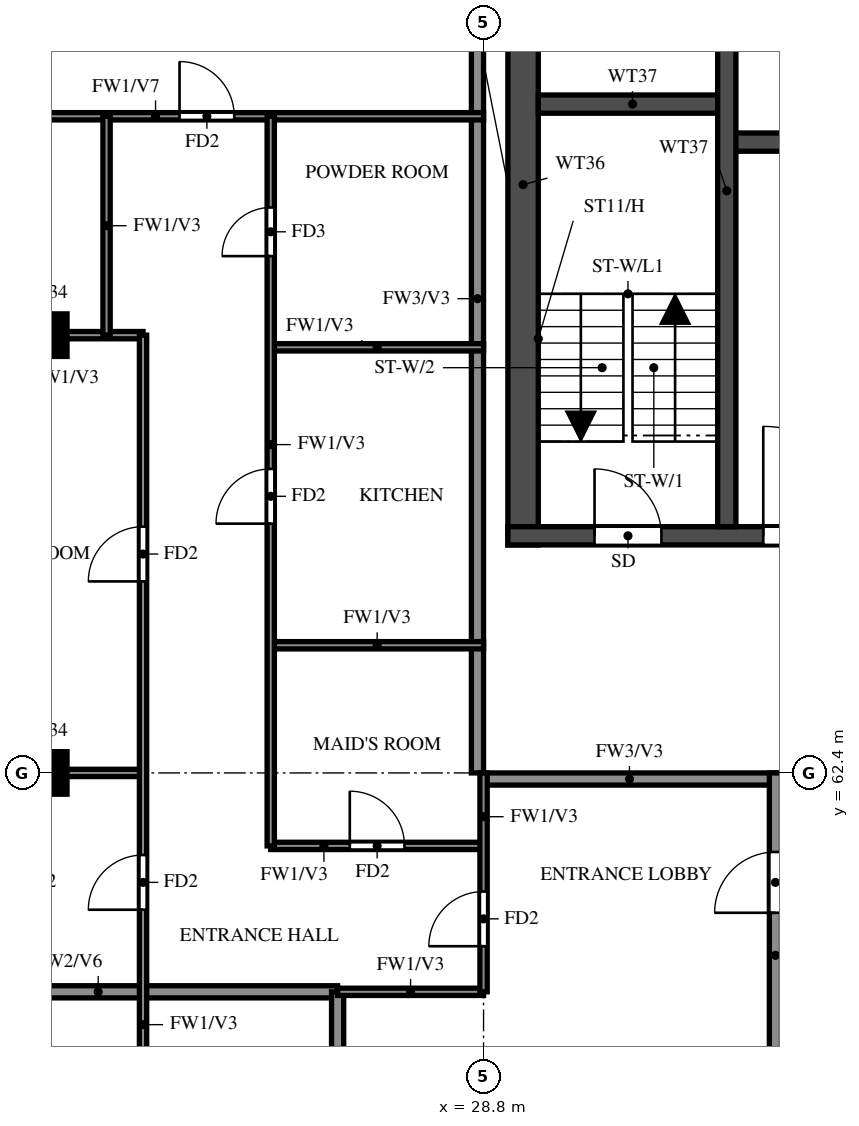
"""IFC4 building model, lengths in metres.
Left out: names, types, materials, properties, quantities, classifications, styles, units other than length and angle.
Written with IfcOpenShell. Run it as: python <this file> out.ifc"""

import sys

from ifc_helpers import new_model, si_unit, direction, frame, frame_2d, origin, origin_2d, place, context, subcontext, project, spatial, rectangle, extrude, source, transform, mapped, element, fill, save


model = new_model("IFC4")
c1 = context("Model", 3, precision=1e-05, world=origin(), true_north=direction((0.0, 1.0)))
c2 = subcontext(c1, "Body", "Model", "MODEL_VIEW")
j1 = project(units=[si_unit("LENGTHUNIT", "METRE"), si_unit("PLANEANGLEUNIT", "RADIAN")], contexts=[c1])
p1 = place(None, origin())
s1 = spatial("IfcSite", under=j1, at=p1, CompositionType="ELEMENT")
p2 = place(p1, origin())
s2 = spatial("IfcBuilding", under=s1, at=p2, CompositionType="ELEMENT")
p3 = place(p2, frame((0.0, 0.0, 253.5)))
s3 = spatial("IfcBuildingStorey", under=s2, at=p3, CompositionType="ELEMENT", Elevation=253.5)
m1 = source(origin(), c2, "Body", "SweptSolid", [
    extrude(rectangle(XDim=0.7, YDim=0.7, at=origin_2d()), origin(), (0.0, 0.0, 1.0), 3.22),
])
for number, where, z_axis, x_axis in (
    (1, (21.6, 62.4, 0.0), (0.0, 0.0, 1.0), (1.0, 0.0, 0.0)),
    (2, (21.6, 69.6, 0.0), (0.0, 0.0, 1.0), (1.0, 0.0, 0.0)),
):
    element("IfcColumn", number, at=place(p3, frame(where, z_axis=z_axis, x_axis=x_axis)), inside=s3, PredefinedType="COLUMN", context=c2, shape_type="MappedRepresentation", body=[
        mapped(m1, transform((0.0, 0.0, 0.0))),
    ])
p4 = place(p3, frame((29.45, 66.15, 0.0), z_axis=(0.0, 0.0, 1.0), x_axis=(0.0, 1.0, 0.0)))
e3 = element("IfcWall", 3, at=p4, inside=s3, PredefinedType="SHEAR", context=c2, shape_type="SweptSolid", body=[
    extrude(rectangle(XDim=11.85, YDim=0.5, at=frame_2d((5.925, 0.0))), origin(), (0.0, 0.0, 1.0), 3.22),
])
p5 = place(p3, frame((29.2, 66.3, 0.0), z_axis=(0.0, 0.0, 1.0), x_axis=(1.0, 0.0, 0.0)))
e4 = element("IfcWall", 4, at=p5, inside=s3, PredefinedType="SHEAR", context=c2, shape_type="SweptSolid", body=[
    extrude(rectangle(XDim=42.4, YDim=0.3, at=frame_2d((21.2, 0.0))), origin(), (0.0, 0.0, 1.0), 3.22),
])
p6 = place(p5, frame((1.425, 0.0, 0.0)))
e5 = element("IfcOpeningElement", 5, at=p6, cuts=e4, PredefinedType="OPENING", context=c2, shape_type="SweptSolid", body=[
    extrude(rectangle(XDim=1.1, YDim=2.1, at=frame_2d((0.55, 1.05))), frame((0.0, 0.16, 0.0), z_axis=(0.0, -1.0, 0.0), x_axis=(1.0, 0.0, 0.0)), (0.0, 0.0, 1.0), 0.32),
])
p7 = place(p5, frame((4.2, 0.0, 0.0)))
e6 = element("IfcOpeningElement", 6, at=p7, cuts=e4, PredefinedType="OPENING", context=c2, shape_type="SweptSolid", body=[
    extrude(rectangle(XDim=1.8, YDim=2.1, at=frame_2d((0.9, 1.05))), frame((0.0, 0.16, 0.0), z_axis=(0.0, -1.0, 0.0), x_axis=(1.0, 0.0, 0.0)), (0.0, 0.0, 1.0), 0.32),
])
p8 = place(p3, frame((32.8, 72.775, 0.0), z_axis=(0.0, 0.0, 1.0), x_axis=(1.0, 0.0, 0.0)))
e7 = element("IfcWall", 7, at=p8, inside=s3, PredefinedType="SHEAR", context=c2, shape_type="SweptSolid", body=[
    extrude(rectangle(XDim=35.2, YDim=0.3, at=frame_2d((17.6, 0.0))), origin(), (0.0, 0.0, 1.0), 3.22),
])
p9 = place(p8, frame((19.8, 0.0, 0.0)))
e8 = element("IfcOpeningElement", 8, at=p9, cuts=e7, PredefinedType="OPENING", context=c2, shape_type="SweptSolid", body=[
    extrude(rectangle(XDim=1.1, YDim=2.1, at=frame_2d((0.55, 1.05))), frame((0.0, 0.16, 0.0), z_axis=(0.0, -1.0, 0.0), x_axis=(1.0, 0.0, 0.0)), (0.0, 0.0, 1.0), 0.32),
])
p10 = place(p8, frame((27.725, 0.0, 0.0)))
e9 = element("IfcOpeningElement", 9, at=p10, cuts=e7, PredefinedType="OPENING", context=c2, shape_type="SweptSolid", body=[
    extrude(rectangle(XDim=1.1, YDim=2.1, at=frame_2d((0.55, 1.05))), frame((0.0, 0.16, 0.0), z_axis=(0.0, -1.0, 0.0), x_axis=(1.0, 0.0, 0.0)), (0.0, 0.0, 1.0), 0.32),
])
p11 = place(p8, frame((30.325, 0.0, 0.0)))
e10 = element("IfcOpeningElement", 10, at=p11, cuts=e7, PredefinedType="OPENING", context=c2, shape_type="SweptSolid", body=[
    extrude(rectangle(XDim=1.1, YDim=2.1, at=frame_2d((0.55, 1.05))), frame((0.0, 0.16, 0.0), z_axis=(0.0, -1.0, 0.0), x_axis=(1.0, 0.0, 0.0)), (0.0, 0.0, 1.0), 0.32),
])
p12 = place(p8, frame((3.825, 0.0, 0.0)))
e11 = element("IfcOpeningElement", 11, at=p12, cuts=e7, PredefinedType="OPENING", context=c2, shape_type="SweptSolid", body=[
    extrude(rectangle(XDim=1.1, YDim=2.1, at=frame_2d((0.55, 1.05))), frame((0.0, 0.16, 0.0), z_axis=(0.0, -1.0, 0.0), x_axis=(1.0, 0.0, 0.0)), (0.0, 0.0, 1.0), 0.32),
])
p13 = place(p8, frame((6.575, 0.0, 0.0)))
e12 = element("IfcOpeningElement", 12, at=p13, cuts=e7, PredefinedType="OPENING", context=c2, shape_type="SweptSolid", body=[
    extrude(rectangle(XDim=1.1, YDim=2.1, at=frame_2d((0.55, 1.05))), frame((0.0, 0.16, 0.0), z_axis=(0.0, -1.0, 0.0), x_axis=(1.0, 0.0, 0.0)), (0.0, 0.0, 1.0), 0.32),
])
p14 = place(p8, frame((9.325, 0.0, 0.0)))
e13 = element("IfcOpeningElement", 13, at=p14, cuts=e7, PredefinedType="OPENING", context=c2, shape_type="SweptSolid", body=[
    extrude(rectangle(XDim=1.1, YDim=2.1, at=frame_2d((0.55, 1.05))), frame((0.0, 0.16, 0.0), z_axis=(0.0, -1.0, 0.0), x_axis=(1.0, 0.0, 0.0)), (0.0, 0.0, 1.0), 0.32),
])
p15 = place(p8, frame((12.075, 0.0, 0.0)))
e14 = element("IfcOpeningElement", 14, at=p15, cuts=e7, PredefinedType="OPENING", context=c2, shape_type="SweptSolid", body=[
    extrude(rectangle(XDim=1.1, YDim=2.1, at=frame_2d((0.55, 1.05))), frame((0.0, 0.16, 0.0), z_axis=(0.0, -1.0, 0.0), x_axis=(1.0, 0.0, 0.0)), (0.0, 0.0, 1.0), 0.32),
])
p16 = place(p8, frame((14.825, 0.0, 0.0)))
e15 = element("IfcOpeningElement", 15, at=p16, cuts=e7, PredefinedType="OPENING", context=c2, shape_type="SweptSolid", body=[
    extrude(rectangle(XDim=1.1, YDim=2.1, at=frame_2d((0.55, 1.05))), frame((0.0, 0.16, 0.0), z_axis=(0.0, -1.0, 0.0), x_axis=(1.0, 0.0, 0.0)), (0.0, 0.0, 1.0), 0.32),
])
p17 = place(p8, frame((17.575, 0.0, 0.0)))
e16 = element("IfcOpeningElement", 16, at=p17, cuts=e7, PredefinedType="OPENING", context=c2, shape_type="SweptSolid", body=[
    extrude(rectangle(XDim=1.1, YDim=2.1, at=frame_2d((0.55, 1.05))), frame((0.0, 0.16, 0.0), z_axis=(0.0, -1.0, 0.0), x_axis=(1.0, 0.0, 0.0)), (0.0, 0.0, 1.0), 0.32),
])
p18 = place(p8, frame((0.95, 0.0, 0.0)))
e17 = element("IfcOpeningElement", 17, at=p18, cuts=e7, PredefinedType="OPENING", context=c2, shape_type="SweptSolid", body=[
    extrude(rectangle(XDim=1.1, YDim=2.1, at=frame_2d((0.55, 1.05))), frame((0.0, 0.16, 0.0), z_axis=(0.0, -1.0, 0.0), x_axis=(1.0, 0.0, 0.0)), (0.0, 0.0, 1.0), 0.32),
])
p19 = place(p3, frame((29.7, 73.4, 0.0), z_axis=(0.0, 0.0, 1.0), x_axis=(1.0, 0.0, 0.0)))
e18 = element("IfcWall", 18, at=p19, inside=s3, PredefinedType="SHEAR", context=c2, shape_type="SweptSolid", body=[
    extrude(rectangle(XDim=3.1, YDim=0.3, at=frame_2d((1.55, 0.0))), origin(), (0.0, 0.0, 1.0), 3.22),
])
p20 = place(p3, frame((32.8, 66.45, 0.0), z_axis=(0.0, 0.0, 1.0), x_axis=(0.0, 1.0, 0.0)))
e19 = element("IfcWall", 19, at=p20, inside=s3, PredefinedType="SHEAR", context=c2, shape_type="SweptSolid", body=[
    extrude(rectangle(XDim=11.05, YDim=0.3, at=frame_2d((5.525, 0.0))), origin(), (0.0, 0.0, 1.0), 3.22),
])
p21 = place(p3, frame((28.8, 62.3, 0.0), z_axis=(0.0, 0.0, 1.0), x_axis=(1.0, 0.0, 0.0)))
e20 = element("IfcWall", 20, at=p21, inside=s3, PredefinedType="SOLIDWALL", context=c2, shape_type="SweptSolid", body=[
    extrude(rectangle(XDim=4.8, YDim=0.2, at=frame_2d((2.4, 0.0))), origin(), (0.0, 0.0, 1.0), 3.22),
])
p22 = place(p3, frame((28.7, 62.4, 0.0), z_axis=(0.0, 0.0, 1.0), x_axis=(0.0, 1.0, 0.0)))
e21 = element("IfcWall", 21, at=p22, inside=s3, PredefinedType="SOLIDWALL", context=c2, shape_type="SweptSolid", body=[
    extrude(rectangle(XDim=15.6, YDim=0.2, at=frame_2d((7.8, 0.0))), origin(), (0.0, 0.0, 1.0), 3.22),
])
p23 = place(p3, frame((33.6, 56.4, 0.0), z_axis=(0.0, 0.0, 1.0), x_axis=(0.0, 1.0, 0.0)))
e22 = element("IfcWall", 22, at=p23, inside=s3, PredefinedType="SOLIDWALL", context=c2, shape_type="SweptSolid", body=[
    extrude(rectangle(XDim=6.0, YDim=0.2, at=frame_2d((3.0, 0.0))), origin(), (0.0, 0.0, 1.0), 3.22),
])
p24 = place(p23, frame((3.7, 0.0, 0.0)))
e23 = element("IfcOpeningElement", 23, at=p24, cuts=e22, PredefinedType="OPENING", context=c2, shape_type="SweptSolid", body=[
    extrude(rectangle(XDim=1.0, YDim=2.1, at=frame_2d((0.5, 1.05))), frame((0.0, 0.11, 0.0), z_axis=(0.0, -1.0, 0.0), x_axis=(1.0, 0.0, 0.0)), (0.0, 0.0, 1.0), 0.22),
])
p25 = place(p3, frame((18.525, 58.8, 0.0), z_axis=(0.0, 0.0, 1.0), x_axis=(1.0, 0.0, 0.0)))
e24 = element("IfcWall", 24, at=p25, inside=s3, PredefinedType="SOLIDWALL", context=c2, shape_type="SweptSolid", body=[
    extrude(rectangle(XDim=7.875, YDim=0.2, at=frame_2d((3.938, 0.0))), origin(), (0.0, 0.0, 1.0), 2.32),
])
p26 = place(p3, frame((26.4, 56.4, 0.0), z_axis=(0.0, 0.0, 1.0), x_axis=(0.0, 1.0, 0.0)))
e25 = element("IfcWall", 25, at=p26, inside=s3, PredefinedType="SOLIDWALL", context=c2, shape_type="SweptSolid", body=[
    extrude(rectangle(XDim=2.4, YDim=0.2, at=frame_2d((1.2, 0.0))), origin(), (0.0, 0.0, 1.0), 3.22),
])
p27 = place(p3, frame((26.4, 58.8, 0.0), z_axis=(0.0, 0.0, 1.0), x_axis=(1.0, 0.0, 0.0)))
e26 = element("IfcWall", 26, at=p27, inside=s3, PredefinedType="PARTITIONING", context=c2, shape_type="SweptSolid", body=[
    extrude(rectangle(XDim=2.4, YDim=0.12, at=frame_2d((1.2, 0.0))), origin(), (0.0, 0.0, 1.0), 3.22),
])
p28 = place(p3, frame((25.3, 61.2, 0.0), z_axis=(0.0, 0.0, 1.0), x_axis=(1.0, 0.0, 0.0)))
e27 = element("IfcWall", 27, at=p28, inside=s3, PredefinedType="PARTITIONING", context=c2, shape_type="SweptSolid", body=[
    extrude(rectangle(XDim=3.5, YDim=0.12, at=frame_2d((1.75, 0.0))), origin(), (0.0, 0.0, 1.0), 3.22),
])
p29 = place(p28, frame((1.3, 0.0, 0.0)))
e28 = element("IfcOpeningElement", 28, at=p29, cuts=e27, PredefinedType="OPENING", context=c2, shape_type="SweptSolid", body=[
    extrude(rectangle(XDim=0.9, YDim=2.1, at=frame_2d((0.45, 1.05))), frame((0.0, 0.07, 0.0), z_axis=(0.0, -1.0, 0.0), x_axis=(1.0, 0.0, 0.0)), (0.0, 0.0, 1.0), 0.14),
])
p30 = place(p3, frame((18.525, 62.4, 0.0), z_axis=(0.0, 0.0, 1.0), x_axis=(1.0, 0.0, 0.0)))
e29 = element("IfcWall", 29, at=p30, inside=s3, PredefinedType="PARTITIONING", context=c2, shape_type="SweptSolid", body=[
    extrude(rectangle(XDim=4.675, YDim=0.12, at=frame_2d((2.337, 0.0))), origin(), (0.0, 0.0, 1.0), 3.22),
])
for number, where, z_axis, x_axis in (
    (30, (25.3, 64.5, 0.0), (0.0, 0.0, 1.0), (1.0, 0.0, 0.0)),
    (31, (25.3, 69.4, 0.0), (0.0, 0.0, 1.0), (1.0, 0.0, 0.0)),
):
    element("IfcWall", number, at=place(p3, frame(where, z_axis=z_axis, x_axis=x_axis)), inside=s3, PredefinedType="PARTITIONING", context=c2, shape_type="SweptSolid", body=[
        extrude(rectangle(XDim=3.5, YDim=0.12, at=frame_2d((1.75, 0.0))), origin(), (0.0, 0.0, 1.0), 3.22),
    ])
p31 = place(p3, frame((18.525, 69.6, 0.0), z_axis=(0.0, 0.0, 1.0), x_axis=(1.0, 0.0, 0.0)))
e32 = element("IfcWall", 32, at=p31, inside=s3, PredefinedType="PARTITIONING", context=c2, shape_type="SweptSolid", body=[
    extrude(rectangle(XDim=4.675, YDim=0.12, at=frame_2d((2.337, 0.0))), origin(), (0.0, 0.0, 1.0), 3.22),
])
p32 = place(p31, frame((1.538, 0.0, 0.0)))
e33 = element("IfcOpeningElement", 33, at=p32, cuts=e32, PredefinedType="OPENING", context=c2, shape_type="SweptSolid", body=[
    extrude(rectangle(XDim=0.8, YDim=2.1, at=frame_2d((0.4, 1.05))), frame((0.0, 0.07, 0.0), z_axis=(0.0, -1.0, 0.0), x_axis=(1.0, 0.0, 0.0)), (0.0, 0.0, 1.0), 0.14),
])
p33 = place(p3, frame((18.525, 73.2, 0.0), z_axis=(0.0, 0.0, 1.0), x_axis=(1.0, 0.0, 0.0)))
e34 = element("IfcWall", 34, at=p33, inside=s3, PredefinedType="PARTITIONING", context=c2, shape_type="SweptSolid", body=[
    extrude(rectangle(XDim=10.275, YDim=0.12, at=frame_2d((5.138, 0.0))), origin(), (0.0, 0.0, 1.0), 2.32),
])
p34 = place(p33, frame((5.275, 0.0, 0.0)))
e35 = element("IfcOpeningElement", 35, at=p34, cuts=e34, PredefinedType="OPENING", context=c2, shape_type="SweptSolid", body=[
    extrude(rectangle(XDim=0.9, YDim=2.1, at=frame_2d((0.45, 1.05))), frame((0.0, 0.07, 0.0), z_axis=(0.0, -1.0, 0.0), x_axis=(1.0, 0.0, 0.0)), (0.0, 0.0, 1.0), 0.14),
])
p35 = place(p3, frame((22.6, 69.6, 0.0), z_axis=(0.0, 0.0, 1.0), x_axis=(0.0, 1.0, 0.0)))
e36 = element("IfcWall", 36, at=p35, inside=s3, PredefinedType="PARTITIONING", context=c2, shape_type="SweptSolid", body=[
    extrude(rectangle(XDim=3.6, YDim=0.12, at=frame_2d((1.8, 0.0))), origin(), (0.0, 0.0, 1.0), 3.22),
])
p36 = place(p3, frame((23.2, 48.0, 0.0), z_axis=(0.0, 0.0, 1.0), x_axis=(0.0, 1.0, 0.0)))
e37 = element("IfcWall", 37, at=p36, inside=s3, PredefinedType="PARTITIONING", context=c2, shape_type="SweptSolid", body=[
    extrude(rectangle(XDim=21.6, YDim=0.12, at=frame_2d((10.8, 0.0))), origin(), (0.0, 0.0, 1.0), 3.22),
])
p37 = place(p36, frame((1.35, 0.0, 0.0)))
e38 = element("IfcOpeningElement", 38, at=p37, cuts=e37, PredefinedType="OPENING", context=c2, shape_type="SweptSolid", body=[
    extrude(rectangle(XDim=0.9, YDim=2.1, at=frame_2d((0.45, 1.05))), frame((0.0, 0.07, 0.0), z_axis=(0.0, -1.0, 0.0), x_axis=(1.0, 0.0, 0.0)), (0.0, 0.0, 1.0), 0.14),
])
p38 = place(p36, frame((7.95, 0.0, 0.0)))
e39 = element("IfcOpeningElement", 39, at=p38, cuts=e37, PredefinedType="OPENING", context=c2, shape_type="SweptSolid", body=[
    extrude(rectangle(XDim=1.5, YDim=2.1, at=frame_2d((0.75, 1.05))), frame((0.0, 0.07, 0.0), z_axis=(0.0, -1.0, 0.0), x_axis=(1.0, 0.0, 0.0)), (0.0, 0.0, 1.0), 0.14),
])
p39 = place(p36, frame((12.15, 0.0, 0.0)))
e40 = element("IfcOpeningElement", 40, at=p39, cuts=e37, PredefinedType="OPENING", context=c2, shape_type="SweptSolid", body=[
    extrude(rectangle(XDim=0.9, YDim=2.1, at=frame_2d((0.45, 1.05))), frame((0.0, 0.07, 0.0), z_axis=(0.0, -1.0, 0.0), x_axis=(1.0, 0.0, 0.0)), (0.0, 0.0, 1.0), 0.14),
])
p40 = place(p36, frame((17.55, 0.0, 0.0)))
e41 = element("IfcOpeningElement", 41, at=p40, cuts=e37, PredefinedType="OPENING", context=c2, shape_type="SweptSolid", body=[
    extrude(rectangle(XDim=0.9, YDim=2.1, at=frame_2d((0.45, 1.05))), frame((0.0, 0.07, 0.0), z_axis=(0.0, -1.0, 0.0), x_axis=(1.0, 0.0, 0.0)), (0.0, 0.0, 1.0), 0.14),
])
p41 = place(p3, frame((25.3, 61.2, 0.0), z_axis=(0.0, 0.0, 1.0), x_axis=(0.0, 1.0, 0.0)))
e42 = element("IfcWall", 42, at=p41, inside=s3, PredefinedType="PARTITIONING", context=c2, shape_type="SweptSolid", body=[
    extrude(rectangle(XDim=12.0, YDim=0.12, at=frame_2d((6.0, 0.0))), origin(), (0.0, 0.0, 1.0), 3.22),
])
p42 = place(p41, frame((5.3, 0.0, 0.0)))
e43 = element("IfcOpeningElement", 43, at=p42, cuts=e42, PredefinedType="OPENING", context=c2, shape_type="SweptSolid", body=[
    extrude(rectangle(XDim=0.9, YDim=2.1, at=frame_2d((0.45, 1.05))), frame((0.0, 0.07, 0.0), z_axis=(0.0, -1.0, 0.0), x_axis=(1.0, 0.0, 0.0)), (0.0, 0.0, 1.0), 0.14),
])
p43 = place(p41, frame((9.7, 0.0, 0.0)))
e44 = element("IfcOpeningElement", 44, at=p43, cuts=e42, PredefinedType="OPENING", context=c2, shape_type="SweptSolid", body=[
    extrude(rectangle(XDim=0.8, YDim=2.1, at=frame_2d((0.4, 1.05))), frame((0.0, 0.07, 0.0), z_axis=(0.0, -1.0, 0.0), x_axis=(1.0, 0.0, 0.0)), (0.0, 0.0, 1.0), 0.14),
])
p44 = place(p3, frame((28.8, 58.8, 0.0), z_axis=(0.0, 0.0, 1.0), x_axis=(0.0, 1.0, 0.0)))
e45 = element("IfcWall", 45, at=p44, inside=s3, PredefinedType="PARTITIONING", context=c2, shape_type="SweptSolid", body=[
    extrude(rectangle(XDim=3.6, YDim=0.12, at=frame_2d((1.8, 0.0))), origin(), (0.0, 0.0, 1.0), 3.22),
])
p45 = place(p44, frame((0.75, 0.0, 0.0)))
e46 = element("IfcOpeningElement", 46, at=p45, cuts=e45, PredefinedType="OPENING", context=c2, shape_type="SweptSolid", body=[
    extrude(rectangle(XDim=0.9, YDim=2.1, at=frame_2d((0.45, 1.05))), frame((0.0, 0.07, 0.0), z_axis=(0.0, -1.0, 0.0), x_axis=(1.0, 0.0, 0.0)), (0.0, 0.0, 1.0), 0.14),
])
p46 = place(p6, origin())
e47 = element("IfcDoor", 47, at=p46, inside=s3, OperationType="SINGLE_SWING_LEFT", PredefinedType="DOOR", context=c2, shape_type="SweptSolid", body=[
    extrude(rectangle(XDim=1.1, YDim=2.1, at=frame_2d((0.55, 1.05))), frame((0.0, 0.025, 0.0), z_axis=(0.0, -1.0, 0.0), x_axis=(1.0, 0.0, 0.0)), (0.0, 0.0, 1.0), 0.05),
])
fill(e5, e47)
p47 = place(p7, origin())
e48 = element("IfcDoor", 48, at=p47, inside=s3, OperationType="DOUBLE_DOOR_SINGLE_SWING", PredefinedType="DOOR", context=c2, shape_type="SweptSolid", body=[
    extrude(rectangle(XDim=1.8, YDim=2.1, at=frame_2d((0.9, 1.05))), frame((0.0, 0.025, 0.0), z_axis=(0.0, -1.0, 0.0), x_axis=(1.0, 0.0, 0.0)), (0.0, 0.0, 1.0), 0.05),
])
fill(e6, e48)
p48 = place(p45, origin())
e49 = element("IfcDoor", 49, at=p48, inside=s3, OperationType="SINGLE_SWING_RIGHT", PredefinedType="DOOR", context=c2, shape_type="SweptSolid", body=[
    extrude(rectangle(XDim=0.9, YDim=2.1, at=frame_2d((0.45, 1.05))), frame((0.0, 0.025, 0.0), z_axis=(0.0, -1.0, 0.0), x_axis=(1.0, 0.0, 0.0)), (0.0, 0.0, 1.0), 0.05),
])
fill(e46, e49)
p49 = place(p24, origin())
e50 = element("IfcDoor", 50, at=p49, inside=s3, OperationType="SINGLE_SWING_LEFT", PredefinedType="DOOR", context=c2, shape_type="SweptSolid", body=[
    extrude(rectangle(XDim=1.0, YDim=2.1, at=frame_2d((0.5, 1.05))), frame((0.0, 0.025, 0.0), z_axis=(0.0, -1.0, 0.0), x_axis=(1.0, 0.0, 0.0)), (0.0, 0.0, 1.0), 0.05),
])
fill(e23, e50)
p50 = place(p39, origin())
e51 = element("IfcDoor", 51, at=p50, inside=s3, OperationType="SINGLE_SWING_LEFT", PredefinedType="DOOR", context=c2, shape_type="SweptSolid", body=[
    extrude(rectangle(XDim=0.9, YDim=2.1, at=frame_2d((0.45, 1.05))), frame((0.0, 0.025, 0.0), z_axis=(0.0, -1.0, 0.0), x_axis=(1.0, 0.0, 0.0)), (0.0, 0.0, 1.0), 0.05),
])
fill(e40, e51)
p51 = place(p40, origin())
e52 = element("IfcDoor", 52, at=p51, inside=s3, OperationType="SINGLE_SWING_RIGHT", PredefinedType="DOOR", context=c2, shape_type="SweptSolid", body=[
    extrude(rectangle(XDim=0.9, YDim=2.1, at=frame_2d((0.45, 1.05))), frame((0.0, 0.025, 0.0), z_axis=(0.0, -1.0, 0.0), x_axis=(1.0, 0.0, 0.0)), (0.0, 0.0, 1.0), 0.05),
])
fill(e41, e52)
p52 = place(p34, origin())
e53 = element("IfcDoor", 53, at=p52, inside=s3, OperationType="SINGLE_SWING_LEFT", PredefinedType="DOOR", context=c2, shape_type="SweptSolid", body=[
    extrude(rectangle(XDim=0.9, YDim=2.1, at=frame_2d((0.45, 1.05))), frame((0.0, 0.025, 0.0), z_axis=(0.0, -1.0, 0.0), x_axis=(1.0, 0.0, 0.0)), (0.0, 0.0, 1.0), 0.05),
])
fill(e35, e53)
p53 = place(p29, origin())
e54 = element("IfcDoor", 54, at=p53, inside=s3, OperationType="SINGLE_SWING_RIGHT", PredefinedType="DOOR", context=c2, shape_type="SweptSolid", body=[
    extrude(rectangle(XDim=0.9, YDim=2.1, at=frame_2d((0.45, 1.05))), frame((0.0, 0.025, 0.0), z_axis=(0.0, -1.0, 0.0), x_axis=(1.0, 0.0, 0.0)), (0.0, 0.0, 1.0), 0.05),
])
fill(e28, e54)
p54 = place(p42, origin())
e55 = element("IfcDoor", 55, at=p54, inside=s3, OperationType="SINGLE_SWING_LEFT", PredefinedType="DOOR", context=c2, shape_type="SweptSolid", body=[
    extrude(rectangle(XDim=0.9, YDim=2.1, at=frame_2d((0.45, 1.05))), frame((0.0, 0.025, 0.0), z_axis=(0.0, -1.0, 0.0), x_axis=(1.0, 0.0, 0.0)), (0.0, 0.0, 1.0), 0.05),
])
fill(e43, e55)
p55 = place(p43, origin())
e56 = element("IfcDoor", 56, at=p55, inside=s3, OperationType="SINGLE_SWING_LEFT", PredefinedType="DOOR", context=c2, shape_type="SweptSolid", body=[
    extrude(rectangle(XDim=0.8, YDim=2.1, at=frame_2d((0.4, 1.05))), frame((0.0, 0.025, 0.0), z_axis=(0.0, -1.0, 0.0), x_axis=(1.0, 0.0, 0.0)), (0.0, 0.0, 1.0), 0.05),
])
fill(e44, e56)
save(model, sys.argv[1])
